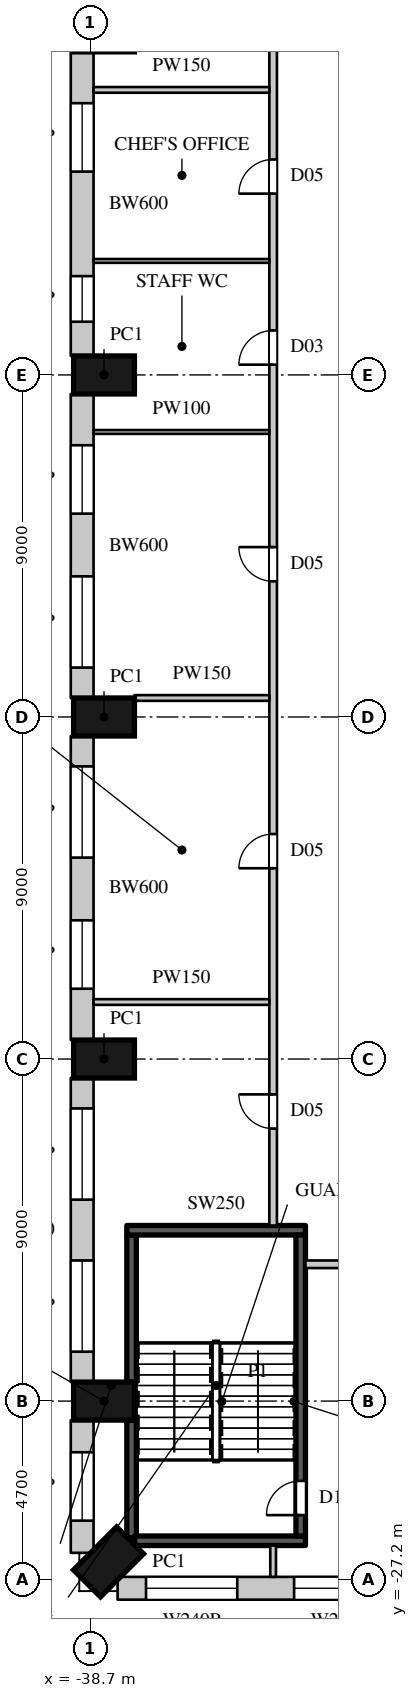
"""IFC4 building model, lengths in metres.
Left out: names, types, materials, properties, quantities, classifications, styles, units other than length and angle.
Written with IfcOpenShell. Run it as: python <this file> out.ifc"""

import sys

from ifc_helpers import new_model, si_unit, direction, frame, frame_2d, origin, origin_2d, place, context, subcontext, project, spatial, rectangle, extrude, element, fill, save


model = new_model("IFC4")
c1 = context("Model", 3, precision=1e-05, world=origin(), true_north=direction((0.0, 1.0)))
c2 = subcontext(c1, "Body", "Model", "MODEL_VIEW")
j1 = project(units=[si_unit("LENGTHUNIT", "METRE"), si_unit("PLANEANGLEUNIT", "RADIAN")], contexts=[c1])
p1 = place(None, origin())
s1 = spatial("IfcSite", under=j1, at=p1, CompositionType="ELEMENT")
p2 = place(p1, origin())
s2 = spatial("IfcBuilding", under=s1, at=p2, CompositionType="ELEMENT")
p3 = place(p2, frame((0.0, 0.0, 36.0)))
s3 = spatial("IfcBuildingStorey", under=s2, at=p3, CompositionType="ELEMENT", Elevation=36.0)
for number, where, z_axis, x_axis in (
    (1, (-38.231, -26.731, 0.0), (0.0, 0.0, 1.0), (0.707, -0.707, 0.0)),
    (2, (-38.35, 4.5, 0.0), (0.0, 0.0, 1.0), (0.0, -1.0, 0.0)),
    (3, (-38.35, -4.5, 0.0), (0.0, 0.0, 1.0), (0.0, -1.0, 0.0)),
    (4, (-38.35, -13.5, 0.0), (0.0, 0.0, 1.0), (0.0, -1.0, 0.0)),
    (5, (-38.35, -22.5, 0.0), (0.0, 0.0, 1.0), (0.0, -1.0, 0.0)),
):
    element("IfcColumn", number, at=place(p3, frame(where, z_axis=z_axis, x_axis=x_axis)), inside=s3, PredefinedType="COLUMN", context=c2, shape_type="SweptSolid", body=[
        extrude(rectangle(XDim=1.0, YDim=1.6, at=origin_2d()), origin(), (0.0, 0.0, 1.0), 8.0),
    ])
p4 = place(p3, frame((-37.993, -27.425, 0.0), z_axis=(0.0, 0.0, 1.0), x_axis=(1.0, 0.0, 0.0)))
e6 = element("IfcWall", 6, at=p4, inside=s3, PredefinedType="ELEMENTEDWALL", context=c2, shape_type="SweptSolid", body=[
    extrude(rectangle(XDim=7.793, YDim=0.6, at=frame_2d((3.896, 0.0))), origin(), (0.0, 0.0, 1.0), 7.6),
])
p5 = place(p4, frame((0.748, 0.0, 1.5)))
e7 = element("IfcOpeningElement", 7, at=p5, cuts=e6, PredefinedType="OPENING", context=c2, shape_type="SweptSolid", body=[
    extrude(rectangle(XDim=2.4, YDim=2.4, at=frame_2d((1.2, 1.2))), frame((0.0, 0.31, 0.0), z_axis=(0.0, -1.0, 0.0), x_axis=(1.0, 0.0, 0.0)), (0.0, 0.0, 1.0), 0.62),
])
p6 = place(p4, frame((4.645, 0.0, 1.5)))
e8 = element("IfcOpeningElement", 8, at=p6, cuts=e6, PredefinedType="OPENING", context=c2, shape_type="SweptSolid", body=[
    extrude(rectangle(XDim=2.4, YDim=2.4, at=frame_2d((1.2, 1.2))), frame((0.0, 0.31, 0.0), z_axis=(0.0, -1.0, 0.0), x_axis=(1.0, 0.0, 0.0)), (0.0, 0.0, 1.0), 0.62),
])
p7 = place(p3, frame((-38.925, 13.0, 0.0), z_axis=(0.0, 0.0, 1.0), x_axis=(0.0, -1.0, 0.0)))
e9 = element("IfcWall", 9, at=p7, inside=s3, PredefinedType="ELEMENTEDWALL", context=c2, shape_type="SweptSolid", body=[
    extrude(rectangle(XDim=8.0, YDim=0.6, at=frame_2d((4.0, 0.0))), origin(), (0.0, 0.0, 1.0), 7.6),
])
p8 = place(p7, frame((1.35, 0.0, 1.5)))
e10 = element("IfcOpeningElement", 10, at=p8, cuts=e9, PredefinedType="OPENING", context=c2, shape_type="SweptSolid", body=[
    extrude(rectangle(XDim=1.8, YDim=2.4, at=frame_2d((0.9, 1.2))), frame((0.0, 0.31, 0.0), z_axis=(0.0, -1.0, 0.0), x_axis=(1.0, 0.0, 0.0)), (0.0, 0.0, 1.0), 0.62),
])
p9 = place(p7, frame((5.9, 0.0, 1.5)))
e11 = element("IfcOpeningElement", 11, at=p9, cuts=e9, PredefinedType="OPENING", context=c2, shape_type="SweptSolid", body=[
    extrude(rectangle(XDim=1.2, YDim=2.4, at=frame_2d((0.6, 1.2))), frame((0.0, 0.31, 0.0), z_axis=(0.0, -1.0, 0.0), x_axis=(1.0, 0.0, 0.0)), (0.0, 0.0, 1.0), 0.62),
])
p10 = place(p3, frame((-38.925, 4.0, 0.0), z_axis=(0.0, 0.0, 1.0), x_axis=(0.0, -1.0, 0.0)))
e12 = element("IfcWall", 12, at=p10, inside=s3, PredefinedType="ELEMENTEDWALL", context=c2, shape_type="SweptSolid", body=[
    extrude(rectangle(XDim=8.0, YDim=0.6, at=frame_2d((4.0, 0.0))), origin(), (0.0, 0.0, 1.0), 7.6),
])
p11 = place(p10, frame((4.8, 0.0, 1.5)))
e13 = element("IfcOpeningElement", 13, at=p11, cuts=e12, PredefinedType="OPENING", context=c2, shape_type="SweptSolid", body=[
    extrude(rectangle(XDim=2.4, YDim=2.4, at=frame_2d((1.2, 1.2))), frame((0.0, 0.31, 0.0), z_axis=(0.0, -1.0, 0.0), x_axis=(1.0, 0.0, 0.0)), (0.0, 0.0, 1.0), 0.62),
])
p12 = place(p10, frame((1.35, 0.0, 1.5)))
e14 = element("IfcOpeningElement", 14, at=p12, cuts=e12, PredefinedType="OPENING", context=c2, shape_type="SweptSolid", body=[
    extrude(rectangle(XDim=1.8, YDim=2.4, at=frame_2d((0.9, 1.2))), frame((0.0, 0.31, 0.0), z_axis=(0.0, -1.0, 0.0), x_axis=(1.0, 0.0, 0.0)), (0.0, 0.0, 1.0), 0.62),
])
p13 = place(p3, frame((-38.925, -5.0, 0.0), z_axis=(0.0, 0.0, 1.0), x_axis=(0.0, -1.0, 0.0)))
e15 = element("IfcWall", 15, at=p13, inside=s3, PredefinedType="ELEMENTEDWALL", context=c2, shape_type="SweptSolid", body=[
    extrude(rectangle(XDim=8.0, YDim=0.6, at=frame_2d((4.0, 0.0))), origin(), (0.0, 0.0, 1.0), 7.6),
])
p14 = place(p13, frame((0.8, 0.0, 1.5)))
e16 = element("IfcOpeningElement", 16, at=p14, cuts=e15, PredefinedType="OPENING", context=c2, shape_type="SweptSolid", body=[
    extrude(rectangle(XDim=2.4, YDim=2.4, at=frame_2d((1.2, 1.2))), frame((0.0, 0.31, 0.0), z_axis=(0.0, -1.0, 0.0), x_axis=(1.0, 0.0, 0.0)), (0.0, 0.0, 1.0), 0.62),
])
p15 = place(p13, frame((4.85, 0.0, 1.5)))
e17 = element("IfcOpeningElement", 17, at=p15, cuts=e15, PredefinedType="OPENING", context=c2, shape_type="SweptSolid", body=[
    extrude(rectangle(XDim=1.8, YDim=2.4, at=frame_2d((0.9, 1.2))), frame((0.0, 0.31, 0.0), z_axis=(0.0, -1.0, 0.0), x_axis=(1.0, 0.0, 0.0)), (0.0, 0.0, 1.0), 0.62),
])
p16 = place(p3, frame((-38.925, -14.0, 0.0), z_axis=(0.0, 0.0, 1.0), x_axis=(0.0, -1.0, 0.0)))
e18 = element("IfcWall", 18, at=p16, inside=s3, PredefinedType="ELEMENTEDWALL", context=c2, shape_type="SweptSolid", body=[
    extrude(rectangle(XDim=8.0, YDim=0.6, at=frame_2d((4.0, 0.0))), origin(), (0.0, 0.0, 1.0), 7.6),
])
p17 = place(p16, frame((0.8, 0.0, 1.5)))
e19 = element("IfcOpeningElement", 19, at=p17, cuts=e18, PredefinedType="OPENING", context=c2, shape_type="SweptSolid", body=[
    extrude(rectangle(XDim=2.4, YDim=2.4, at=frame_2d((1.2, 1.2))), frame((0.0, 0.31, 0.0), z_axis=(0.0, -1.0, 0.0), x_axis=(1.0, 0.0, 0.0)), (0.0, 0.0, 1.0), 0.62),
])
p18 = place(p16, frame((4.8, 0.0, 1.5)))
e20 = element("IfcOpeningElement", 20, at=p18, cuts=e18, PredefinedType="OPENING", context=c2, shape_type="SweptSolid", body=[
    extrude(rectangle(XDim=2.4, YDim=2.4, at=frame_2d((1.2, 1.2))), frame((0.0, 0.31, 0.0), z_axis=(0.0, -1.0, 0.0), x_axis=(1.0, 0.0, 0.0)), (0.0, 0.0, 1.0), 0.62),
])
p19 = place(p3, frame((-38.925, -23.0, 0.0), z_axis=(0.0, 0.0, 1.0), x_axis=(0.0, -1.0, 0.0)))
e21 = element("IfcWall", 21, at=p19, inside=s3, PredefinedType="ELEMENTEDWALL", context=c2, shape_type="SweptSolid", body=[
    extrude(rectangle(XDim=3.493, YDim=0.6, at=frame_2d((1.747, 0.0))), origin(), (0.0, 0.0, 1.0), 7.6),
])
p20 = place(p19, frame((0.846, 0.0, 1.5)))
e22 = element("IfcOpeningElement", 22, at=p20, cuts=e21, PredefinedType="OPENING", context=c2, shape_type="SweptSolid", body=[
    extrude(rectangle(XDim=1.8, YDim=2.4, at=frame_2d((0.9, 1.2))), frame((0.0, 0.31, 0.0), z_axis=(0.0, -1.0, 0.0), x_axis=(1.0, 0.0, 0.0)), (0.0, 0.0, 1.0), 0.62),
])
p21 = place(p3, frame((-33.9, -17.88, 0.0), z_axis=(0.0, 0.0, 1.0), x_axis=(0.0, 1.0, 0.0)))
e23 = element("IfcWall", 23, at=p21, inside=s3, PredefinedType="PARTITIONING", context=c2, shape_type="SweptSolid", body=[
    extrude(rectangle(XDim=35.76, YDim=0.2, at=frame_2d((17.88, 0.0))), origin(), (0.0, 0.0, 1.0), 7.598),
])
p22 = place(p21, frame((2.55, 0.0, 0.0)))
e24 = element("IfcOpeningElement", 24, at=p22, cuts=e23, PredefinedType="OPENING", context=c2, shape_type="SweptSolid", body=[
    extrude(rectangle(XDim=0.9, YDim=2.2, at=frame_2d((0.45, 1.1))), frame((0.0, 0.11, 0.0), z_axis=(0.0, -1.0, 0.0), x_axis=(1.0, 0.0, 0.0)), (0.0, 0.0, 1.0), 0.22),
])
p23 = place(p21, frame((9.4, 0.0, 0.0)))
e25 = element("IfcOpeningElement", 25, at=p23, cuts=e23, PredefinedType="OPENING", context=c2, shape_type="SweptSolid", body=[
    extrude(rectangle(XDim=0.9, YDim=2.2, at=frame_2d((0.45, 1.1))), frame((0.0, 0.11, 0.0), z_axis=(0.0, -1.0, 0.0), x_axis=(1.0, 0.0, 0.0)), (0.0, 0.0, 1.0), 0.22),
])
p24 = place(p21, frame((16.95, 0.0, 0.0)))
e26 = element("IfcOpeningElement", 26, at=p24, cuts=e23, PredefinedType="OPENING", context=c2, shape_type="SweptSolid", body=[
    extrude(rectangle(XDim=0.9, YDim=2.2, at=frame_2d((0.45, 1.1))), frame((0.0, 0.11, 0.0), z_axis=(0.0, -1.0, 0.0), x_axis=(1.0, 0.0, 0.0)), (0.0, 0.0, 1.0), 0.22),
])
p25 = place(p21, frame((22.65, 0.0, 0.0)))
e27 = element("IfcOpeningElement", 27, at=p25, cuts=e23, PredefinedType="OPENING", context=c2, shape_type="SweptSolid", body=[
    extrude(rectangle(XDim=0.9, YDim=2.2, at=frame_2d((0.45, 1.1))), frame((0.0, 0.11, 0.0), z_axis=(0.0, -1.0, 0.0), x_axis=(1.0, 0.0, 0.0)), (0.0, 0.0, 1.0), 0.22),
])
p26 = place(p21, frame((27.15, 0.0, 0.0)))
e28 = element("IfcOpeningElement", 28, at=p26, cuts=e23, PredefinedType="OPENING", context=c2, shape_type="SweptSolid", body=[
    extrude(rectangle(XDim=0.9, YDim=2.2, at=frame_2d((0.45, 1.1))), frame((0.0, 0.11, 0.0), z_axis=(0.0, -1.0, 0.0), x_axis=(1.0, 0.0, 0.0)), (0.0, 0.0, 1.0), 0.22),
])
p27 = place(p21, frame((32.3, 0.0, 0.0)))
e29 = element("IfcOpeningElement", 29, at=p27, cuts=e23, PredefinedType="OPENING", context=c2, shape_type="SweptSolid", body=[
    extrude(rectangle(XDim=0.9, YDim=2.2, at=frame_2d((0.45, 1.1))), frame((0.0, 0.11, 0.0), z_axis=(0.0, -1.0, 0.0), x_axis=(1.0, 0.0, 0.0)), (0.0, 0.0, 1.0), 0.22),
])
p28 = place(p3, frame((-33.05, -18.9, 0.0), z_axis=(0.0, 0.0, 1.0), x_axis=(1.0, 0.0, 0.0)))
e30 = element("IfcWall", 30, at=p28, inside=s3, PredefinedType="PARTITIONING", context=c2, shape_type="SweptSolid", body=[
    extrude(rectangle(XDim=3.363, YDim=0.2, at=frame_2d((1.682, 0.0))), origin(), (0.0, 0.0, 1.0), 7.598),
])
p29 = place(p28, frame((1.2, 0.0, 0.0)))
e31 = element("IfcOpeningElement", 31, at=p29, cuts=e30, PredefinedType="OPENING", context=c2, shape_type="SweptSolid", body=[
    extrude(rectangle(XDim=0.9, YDim=2.2, at=frame_2d((0.45, 1.1))), frame((0.0, 0.11, 0.0), z_axis=(0.0, -1.0, 0.0), x_axis=(1.0, 0.0, 0.0)), (0.0, 0.0, 1.0), 0.22),
])
p30 = place(p3, frame((-38.625, -12.0, 0.0), z_axis=(0.0, 0.0, 1.0), x_axis=(1.0, 0.0, 0.0)))
e32 = element("IfcWall", 32, at=p30, inside=s3, PredefinedType="PARTITIONING", context=c2, shape_type="SweptSolid", body=[
    extrude(rectangle(XDim=4.625, YDim=0.15, at=frame_2d((2.312, 0.0))), origin(), (0.0, 0.0, 1.0), 7.598),
])
p31 = place(p3, frame((-37.55, -4.0, 0.0), z_axis=(0.0, 0.0, 1.0), x_axis=(1.0, 0.0, 0.0)))
e33 = element("IfcWall", 33, at=p31, inside=s3, PredefinedType="PARTITIONING", context=c2, shape_type="SweptSolid", body=[
    extrude(rectangle(XDim=3.55, YDim=0.15, at=frame_2d((1.775, 0.0))), origin(), (0.0, 0.0, 1.0), 7.598),
])
p32 = place(p3, frame((-38.625, 12.0, 0.0), z_axis=(0.0, 0.0, 1.0), x_axis=(1.0, 0.0, 0.0)))
e34 = element("IfcWall", 34, at=p32, inside=s3, PredefinedType="PARTITIONING", context=c2, shape_type="SweptSolid", body=[
    extrude(rectangle(XDim=4.625, YDim=0.15, at=frame_2d((2.312, 0.0))), origin(), (0.0, 0.0, 1.0), 7.598),
])
p33 = place(p3, frame((-33.9, -27.125, 0.0), z_axis=(0.0, 0.0, 1.0), x_axis=(0.0, 1.0, 0.0)))
e35 = element("IfcWall", 35, at=p33, inside=s3, PredefinedType="PARTITIONING", context=c2, shape_type="SweptSolid", body=[
    extrude(rectangle(XDim=0.825, YDim=0.15, at=frame_2d((0.413, 0.0))), origin(), (0.0, 0.0, 1.0), 7.598),
])
p34 = place(p3, frame((-37.625, -26.095, 0.0), z_axis=(0.0, 0.0, 1.0), x_axis=(0.0, 1.0, 0.0)))
e36 = element("IfcWall", 36, at=p34, inside=s3, PredefinedType="SHEAR", context=c2, shape_type="SweptSolid", body=[
    extrude(rectangle(XDim=3.095, YDim=0.25, at=frame_2d((1.548, 0.0))), origin(), (0.0, 0.0, 1.0), 7.6),
])
p35 = place(p3, frame((-37.625, -22.0, 0.0), z_axis=(0.0, 0.0, 1.0), x_axis=(0.0, 1.0, 0.0)))
e37 = element("IfcWall", 37, at=p35, inside=s3, PredefinedType="SHEAR", context=c2, shape_type="SweptSolid", body=[
    extrude(rectangle(XDim=3.87, YDim=0.25, at=frame_2d((1.935, 0.0))), origin(), (0.0, 0.0, 1.0), 7.6),
])
p36 = place(p3, frame((-37.545, -26.175, 0.0), z_axis=(0.0, 0.0, 1.0), x_axis=(1.0, 0.0, 0.0)))
e38 = element("IfcWall", 38, at=p36, inside=s3, PredefinedType="SHEAR", context=c2, shape_type="SweptSolid", body=[
    extrude(rectangle(XDim=4.495, YDim=0.25, at=frame_2d((2.248, 0.0))), origin(), (0.0, 0.0, 1.0), 7.6),
])
p37 = place(p3, frame((-37.75, -18.005, 0.0), z_axis=(0.0, 0.0, 1.0), x_axis=(1.0, 0.0, 0.0)))
e39 = element("IfcWall", 39, at=p37, inside=s3, PredefinedType="SHEAR", context=c2, shape_type="SweptSolid", body=[
    extrude(rectangle(XDim=4.7, YDim=0.25, at=frame_2d((2.35, 0.0))), origin(), (0.0, 0.0, 1.0), 7.6),
])
p38 = place(p3, frame((-33.175, -26.05, 0.0), z_axis=(0.0, 0.0, 1.0), x_axis=(0.0, 1.0, 0.0)))
e40 = element("IfcWall", 40, at=p38, inside=s3, PredefinedType="SHEAR", context=c2, shape_type="SweptSolid", body=[
    extrude(rectangle(XDim=7.92, YDim=0.25, at=frame_2d((3.96, 0.0))), origin(), (0.0, 0.0, 1.0), 7.6),
])
p39 = place(p38, frame((0.55, 0.0, 0.0)))
e41 = element("IfcOpeningElement", 41, at=p39, cuts=e40, PredefinedType="OPENING", context=c2, shape_type="SweptSolid", body=[
    extrude(rectangle(XDim=0.9, YDim=2.2, at=frame_2d((0.45, 1.1))), frame((0.0, 0.135, 0.0), z_axis=(0.0, -1.0, 0.0), x_axis=(1.0, 0.0, 0.0)), (0.0, 0.0, 1.0), 0.27),
])
for number, where, z_axis, x_axis in (
    (42, (-38.625, 3.0, 0.0), (0.0, 0.0, 1.0), (1.0, 0.0, 0.0)),
    (43, (-38.625, 7.5, 0.0), (0.0, 0.0, 1.0), (1.0, 0.0, 0.0)),
):
    element("IfcWall", number, at=place(p3, frame(where, z_axis=z_axis, x_axis=x_axis)), inside=s3, PredefinedType="PARTITIONING", context=c2, shape_type="SweptSolid", body=[
        extrude(rectangle(XDim=4.625, YDim=0.1, at=frame_2d((2.312, 0.0))), origin(), (0.0, 0.0, 1.0), 7.598),
    ])
p40 = place(p5, origin())
e44 = element("IfcWindow", 44, at=p40, inside=s3, PartitioningType="SINGLE_PANEL", PredefinedType="WINDOW", context=c2, shape_type="SweptSolid", body=[
    extrude(rectangle(XDim=2.4, YDim=2.4, at=frame_2d((1.2, 1.2))), frame((0.0, 0.06, 0.0), z_axis=(0.0, -1.0, 0.0), x_axis=(1.0, 0.0, 0.0)), (0.0, 0.0, 1.0), 0.06),
])
fill(e7, e44)
p41 = place(p6, origin())
e45 = element("IfcWindow", 45, at=p41, inside=s3, PartitioningType="SINGLE_PANEL", PredefinedType="WINDOW", context=c2, shape_type="SweptSolid", body=[
    extrude(rectangle(XDim=2.4, YDim=2.4, at=frame_2d((1.2, 1.2))), frame((0.0, 0.06, 0.0), z_axis=(0.0, -1.0, 0.0), x_axis=(1.0, 0.0, 0.0)), (0.0, 0.0, 1.0), 0.06),
])
fill(e8, e45)
p42 = place(p11, origin())
e46 = element("IfcWindow", 46, at=p42, inside=s3, PartitioningType="SINGLE_PANEL", PredefinedType="WINDOW", context=c2, shape_type="SweptSolid", body=[
    extrude(rectangle(XDim=2.4, YDim=2.4, at=frame_2d((1.2, 1.2))), frame((0.0, 0.06, 0.0), z_axis=(0.0, -1.0, 0.0), x_axis=(1.0, 0.0, 0.0)), (0.0, 0.0, 1.0), 0.06),
])
fill(e13, e46)
p43 = place(p14, origin())
e47 = element("IfcWindow", 47, at=p43, inside=s3, PartitioningType="SINGLE_PANEL", PredefinedType="WINDOW", context=c2, shape_type="SweptSolid", body=[
    extrude(rectangle(XDim=2.4, YDim=2.4, at=frame_2d((1.2, 1.2))), frame((0.0, 0.06, 0.0), z_axis=(0.0, -1.0, 0.0), x_axis=(1.0, 0.0, 0.0)), (0.0, 0.0, 1.0), 0.06),
])
fill(e16, e47)
p44 = place(p17, origin())
e48 = element("IfcWindow", 48, at=p44, inside=s3, PartitioningType="SINGLE_PANEL", PredefinedType="WINDOW", context=c2, shape_type="SweptSolid", body=[
    extrude(rectangle(XDim=2.4, YDim=2.4, at=frame_2d((1.2, 1.2))), frame((0.0, 0.06, 0.0), z_axis=(0.0, -1.0, 0.0), x_axis=(1.0, 0.0, 0.0)), (0.0, 0.0, 1.0), 0.06),
])
fill(e19, e48)
p45 = place(p18, origin())
e49 = element("IfcWindow", 49, at=p45, inside=s3, PartitioningType="SINGLE_PANEL", PredefinedType="WINDOW", context=c2, shape_type="SweptSolid", body=[
    extrude(rectangle(XDim=2.4, YDim=2.4, at=frame_2d((1.2, 1.2))), frame((0.0, 0.06, 0.0), z_axis=(0.0, -1.0, 0.0), x_axis=(1.0, 0.0, 0.0)), (0.0, 0.0, 1.0), 0.06),
])
fill(e20, e49)
p46 = place(p20, origin())
e50 = element("IfcWindow", 50, at=p46, inside=s3, PartitioningType="SINGLE_PANEL", PredefinedType="WINDOW", context=c2, shape_type="SweptSolid", body=[
    extrude(rectangle(XDim=1.8, YDim=2.4, at=frame_2d((0.9, 1.2))), frame((0.0, 0.06, 0.0), z_axis=(0.0, -1.0, 0.0), x_axis=(1.0, 0.0, 0.0)), (0.0, 0.0, 1.0), 0.06),
])
fill(e22, e50)
p47 = place(p22, origin())
e51 = element("IfcDoor", 51, at=p47, inside=s3, OperationType="SINGLE_SWING_RIGHT", PredefinedType="DOOR", context=c2, shape_type="SweptSolid", body=[
    extrude(rectangle(XDim=0.9, YDim=2.2, at=frame_2d((0.45, 1.1))), frame((0.0, 0.025, 0.0), z_axis=(0.0, -1.0, 0.0), x_axis=(1.0, 0.0, 0.0)), (0.0, 0.0, 1.0), 0.05),
])
fill(e24, e51)
p48 = place(p23, origin())
e52 = element("IfcDoor", 52, at=p48, inside=s3, OperationType="SINGLE_SWING_LEFT", PredefinedType="DOOR", context=c2, shape_type="SweptSolid", body=[
    extrude(rectangle(XDim=0.9, YDim=2.2, at=frame_2d((0.45, 1.1))), frame((0.0, 0.025, 0.0), z_axis=(0.0, -1.0, 0.0), x_axis=(1.0, 0.0, 0.0)), (0.0, 0.0, 1.0), 0.05),
])
fill(e25, e52)
p49 = place(p24, origin())
e53 = element("IfcDoor", 53, at=p49, inside=s3, OperationType="SINGLE_SWING_RIGHT", PredefinedType="DOOR", context=c2, shape_type="SweptSolid", body=[
    extrude(rectangle(XDim=0.9, YDim=2.2, at=frame_2d((0.45, 1.1))), frame((0.0, 0.025, 0.0), z_axis=(0.0, -1.0, 0.0), x_axis=(1.0, 0.0, 0.0)), (0.0, 0.0, 1.0), 0.05),
])
fill(e26, e53)
p50 = place(p25, origin())
e54 = element("IfcDoor", 54, at=p50, inside=s3, OperationType="SINGLE_SWING_LEFT", PredefinedType="DOOR", context=c2, shape_type="SweptSolid", body=[
    extrude(rectangle(XDim=0.9, YDim=2.2, at=frame_2d((0.45, 1.1))), frame((0.0, 0.025, 0.0), z_axis=(0.0, -1.0, 0.0), x_axis=(1.0, 0.0, 0.0)), (0.0, 0.0, 1.0), 0.05),
])
fill(e27, e54)
p51 = place(p26, origin())
e55 = element("IfcDoor", 55, at=p51, inside=s3, OperationType="SINGLE_SWING_LEFT", PredefinedType="DOOR", context=c2, shape_type="SweptSolid", body=[
    extrude(rectangle(XDim=0.9, YDim=2.2, at=frame_2d((0.45, 1.1))), frame((0.0, 0.025, 0.0), z_axis=(0.0, -1.0, 0.0), x_axis=(1.0, 0.0, 0.0)), (0.0, 0.0, 1.0), 0.05),
])
fill(e28, e55)
p52 = place(p39, origin())
e56 = element("IfcDoor", 56, at=p52, inside=s3, OperationType="SINGLE_SWING_LEFT", PredefinedType="DOOR", context=c2, shape_type="SweptSolid", body=[
    extrude(rectangle(XDim=0.9, YDim=2.2, at=frame_2d((0.45, 1.1))), frame((0.0, 0.025, 0.0), z_axis=(0.0, -1.0, 0.0), x_axis=(1.0, 0.0, 0.0)), (0.0, 0.0, 1.0), 0.05),
])
fill(e41, e56)
p53 = place(p8, origin())
e57 = element("IfcWindow", 57, at=p53, inside=s3, PartitioningType="SINGLE_PANEL", PredefinedType="WINDOW", context=c2, shape_type="SweptSolid", body=[
    extrude(rectangle(XDim=1.8, YDim=2.4, at=frame_2d((0.9, 1.2))), frame((0.0, 0.06, 0.0), z_axis=(0.0, -1.0, 0.0), x_axis=(1.0, 0.0, 0.0)), (0.0, 0.0, 1.0), 0.06),
])
fill(e10, e57)
p54 = place(p9, origin())
e58 = element("IfcWindow", 58, at=p54, inside=s3, PartitioningType="SINGLE_PANEL", PredefinedType="WINDOW", context=c2, shape_type="SweptSolid", body=[
    extrude(rectangle(XDim=1.2, YDim=2.4, at=frame_2d((0.6, 1.2))), frame((0.0, 0.06, 0.0), z_axis=(0.0, -1.0, 0.0), x_axis=(1.0, 0.0, 0.0)), (0.0, 0.0, 1.0), 0.06),
])
fill(e11, e58)
p55 = place(p12, origin())
e59 = element("IfcWindow", 59, at=p55, inside=s3, PartitioningType="SINGLE_PANEL", PredefinedType="WINDOW", context=c2, shape_type="SweptSolid", body=[
    extrude(rectangle(XDim=1.8, YDim=2.4, at=frame_2d((0.9, 1.2))), frame((0.0, 0.06, 0.0), z_axis=(0.0, -1.0, 0.0), x_axis=(1.0, 0.0, 0.0)), (0.0, 0.0, 1.0), 0.06),
])
fill(e14, e59)
p56 = place(p15, origin())
e60 = element("IfcWindow", 60, at=p56, inside=s3, PartitioningType="SINGLE_PANEL", PredefinedType="WINDOW", context=c2, shape_type="SweptSolid", body=[
    extrude(rectangle(XDim=1.8, YDim=2.4, at=frame_2d((0.9, 1.2))), frame((0.0, 0.06, 0.0), z_axis=(0.0, -1.0, 0.0), x_axis=(1.0, 0.0, 0.0)), (0.0, 0.0, 1.0), 0.06),
])
fill(e17, e60)
save(model, sys.argv[1])
